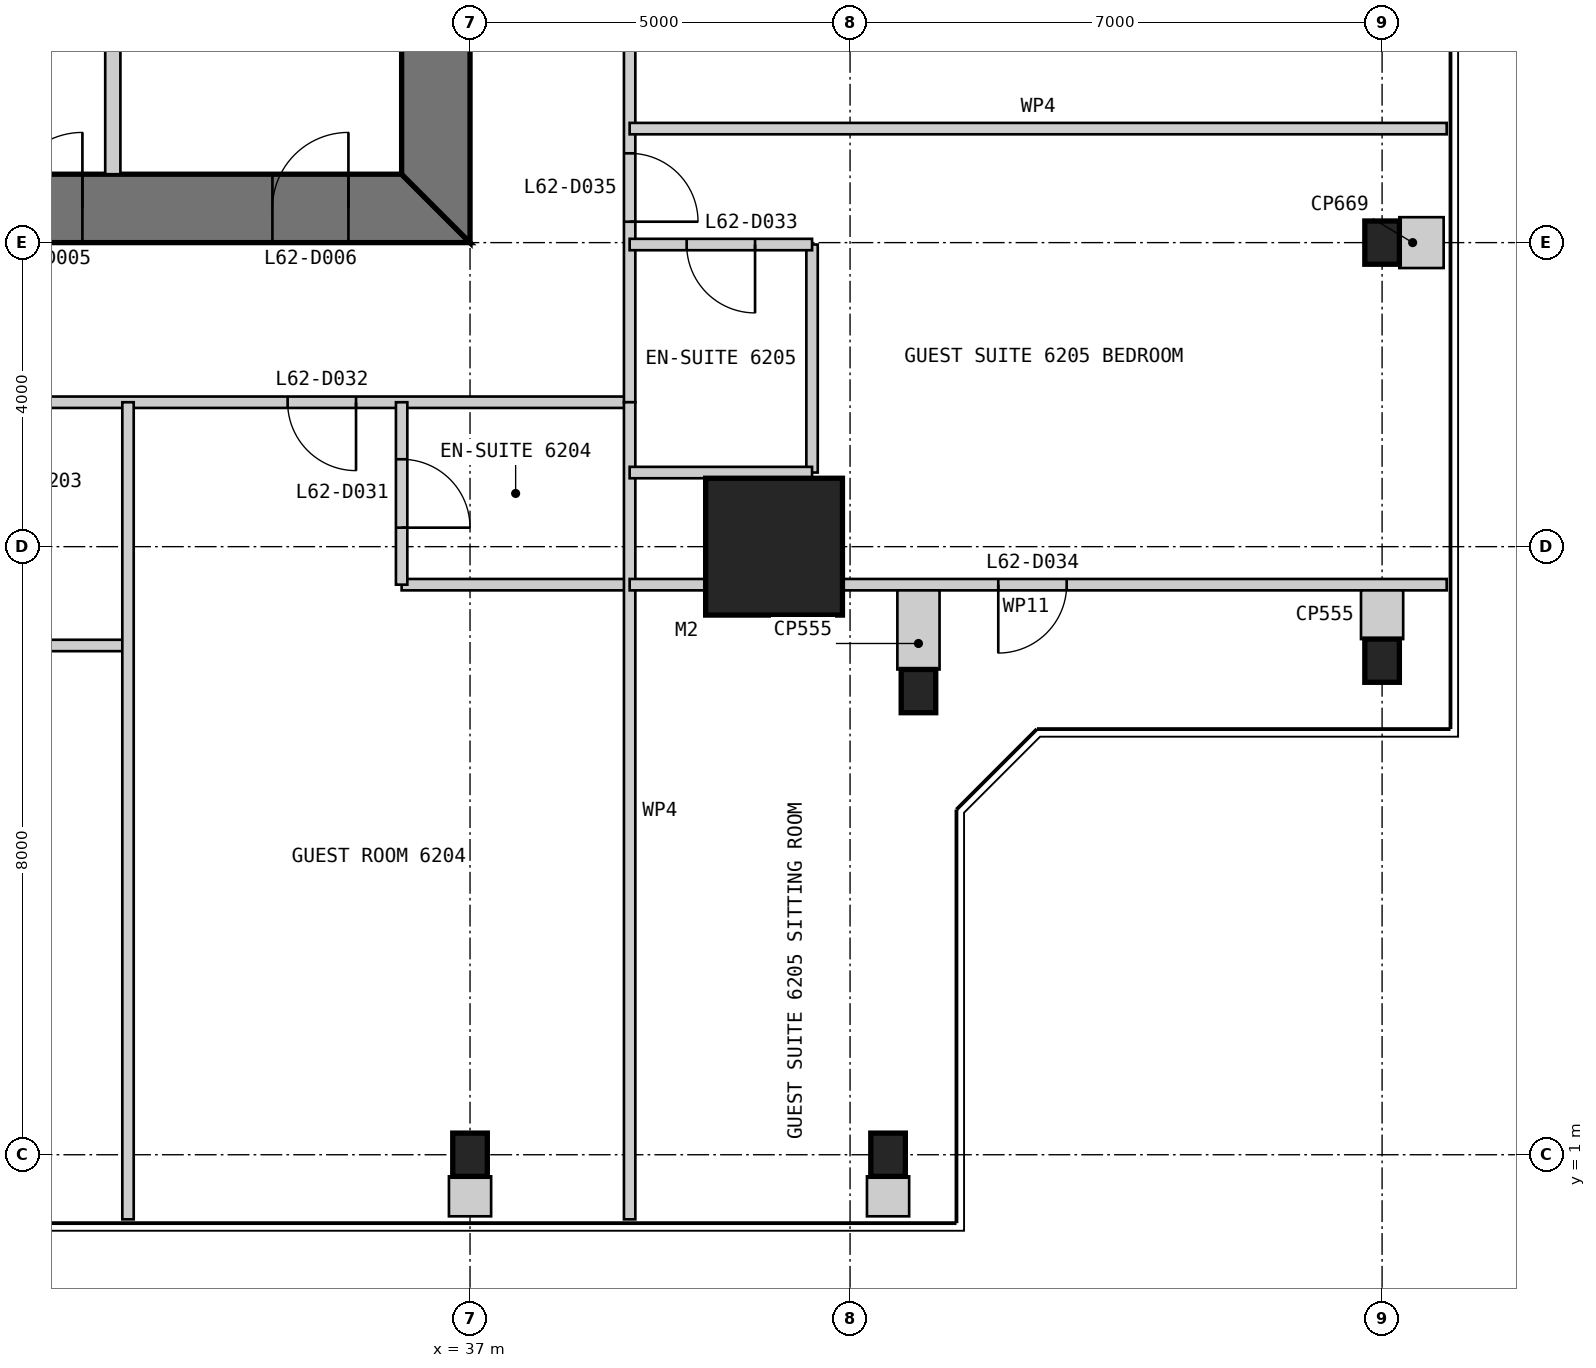
"""IFC4 building model, lengths in metres.
Left out: names, types, materials, properties, quantities, classifications, styles, units other than length and angle.
Written with IfcOpenShell. Run it as: python <this file> out.ifc"""

import sys

from ifc_helpers import new_model, si_unit, direction, frame, frame_2d, origin, origin_2d, place, context, subcontext, project, spatial, polyline, rectangle, i_section, outline, extrude, element, fill, save


model = new_model("IFC4")
c1 = context("Model", 3, precision=1e-05, world=origin(), true_north=direction((0.0, 1.0)))
c2 = subcontext(c1, "Body", "Model", "MODEL_VIEW")
j1 = project(units=[si_unit("LENGTHUNIT", "METRE"), si_unit("PLANEANGLEUNIT", "RADIAN")], contexts=[c1])
p1 = place(None, origin())
s1 = spatial("IfcSite", under=j1, at=p1, CompositionType="ELEMENT")
p2 = place(p1, origin())
s2 = spatial("IfcBuilding", under=s1, at=p2, CompositionType="ELEMENT")
p3 = place(p2, frame((0.0, 0.0, 262.8)))
s3 = spatial("IfcBuildingStorey", under=s2, at=p3, CompositionType="ELEMENT", Elevation=262.8)
p4 = place(p3, frame((41.0, 9.0, 0.0), z_axis=(0.0, 0.0, 1.0), x_axis=(1.0, 0.0, 0.0)))
e1 = element("IfcColumn", 1, at=p4, inside=s3, PredefinedType="COLUMN", context=c2, shape_type="SweptSolid", body=[
    extrude(rectangle(XDim=1.8, YDim=1.8, at=origin_2d()), origin(), (0.0, 0.0, 1.0), 3.4),
])
for number, where, z_axis, x_axis in (
    (2, (37.0, 1.0, 0.0), (0.0, 0.0, 1.0), (1.0, 0.0, 0.0)),
    (3, (42.5, 1.0, 0.0), (0.0, 0.0, 1.0), (1.0, 0.0, 0.0)),
    (4, (42.9, 7.1, 0.0), (0.0, 0.0, 1.0), (1.0, 0.0, 0.0)),
    (5, (49.0, 7.5, 0.0), (0.0, 0.0, 1.0), (1.0, 0.0, 0.0)),
    (6, (49.0, 13.0, 0.0), (0.0, 0.0, 1.0), (1.0, 0.0, 0.0)),
):
    element("IfcColumn", number, at=place(p3, frame(where, z_axis=z_axis, x_axis=x_axis)), inside=s3, PredefinedType="COLUMN", context=c2, shape_type="SweptSolid", body=[
        extrude(i_section(OverallWidth=0.455, OverallDepth=0.569, WebThickness=0.078, FlangeThickness=0.125, at=origin_2d()), origin(), (0.0, 0.0, 1.0), 3.4),
    ])
p5 = place(p3, frame((13.0, 13.45, 0.0), z_axis=(0.0, 0.0, 1.0), x_axis=(1.0, 0.0, 0.0)))
e7 = element("IfcWall", 7, at=p5, inside=s3, PredefinedType="SHEAR", context=c2, shape_type="SweptSolid", body=[
    extrude(outline(polyline([(0.0, -0.45), (24.0, -0.45), (23.1, 0.45), (0.9, 0.45), (0.0, -0.45)])), origin(), (0.0, 0.0, 1.0), 3.4),
])
p6 = place(p5, frame((4.9, 0.0, 0.0)))
e8 = element("IfcOpeningElement", 8, at=p6, cuts=e7, PredefinedType="OPENING", context=c2, shape_type="SweptSolid", body=[
    extrude(rectangle(XDim=1.0, YDim=2.2, at=frame_2d((0.5, 1.1))), frame((0.0, 0.46, 0.0), z_axis=(0.0, -1.0, 0.0), x_axis=(1.0, 0.0, 0.0)), (0.0, 0.0, 1.0), 0.92),
])
p7 = place(p5, frame((8.9, 0.0, 0.0)))
e9 = element("IfcOpeningElement", 9, at=p7, cuts=e7, PredefinedType="OPENING", context=c2, shape_type="SweptSolid", body=[
    extrude(rectangle(XDim=1.1, YDim=2.2, at=frame_2d((0.55, 1.1))), frame((0.0, 0.46, 0.0), z_axis=(0.0, -1.0, 0.0), x_axis=(1.0, 0.0, 0.0)), (0.0, 0.0, 1.0), 0.92),
])
p8 = place(p5, frame((15.05, 0.0, 0.0)))
e10 = element("IfcOpeningElement", 10, at=p8, cuts=e7, PredefinedType="OPENING", context=c2, shape_type="SweptSolid", body=[
    extrude(rectangle(XDim=0.9, YDim=2.2, at=frame_2d((0.45, 1.1))), frame((0.0, 0.46, 0.0), z_axis=(0.0, -1.0, 0.0), x_axis=(1.0, 0.0, 0.0)), (0.0, 0.0, 1.0), 0.92),
])
p9 = place(p5, frame((17.9, 0.0, 0.0)))
e11 = element("IfcOpeningElement", 11, at=p9, cuts=e7, PredefinedType="OPENING", context=c2, shape_type="SweptSolid", body=[
    extrude(rectangle(XDim=1.0, YDim=2.2, at=frame_2d((0.5, 1.1))), frame((0.0, 0.46, 0.0), z_axis=(0.0, -1.0, 0.0), x_axis=(1.0, 0.0, 0.0)), (0.0, 0.0, 1.0), 0.92),
])
p10 = place(p5, frame((21.4, 0.0, 0.0)))
e12 = element("IfcOpeningElement", 12, at=p10, cuts=e7, PredefinedType="OPENING", context=c2, shape_type="SweptSolid", body=[
    extrude(rectangle(XDim=1.0, YDim=2.2, at=frame_2d((0.5, 1.1))), frame((0.0, 0.46, 0.0), z_axis=(0.0, -1.0, 0.0), x_axis=(1.0, 0.0, 0.0)), (0.0, 0.0, 1.0), 0.92),
])
p11 = place(p3, frame((36.55, 13.9, 0.0), z_axis=(0.0, 0.0, 1.0), x_axis=(0.0, 1.0, 0.0)))
e13 = element("IfcWall", 13, at=p11, inside=s3, PredefinedType="SHEAR", context=c2, shape_type="SweptSolid", body=[
    extrude(outline(polyline([(-0.9, -0.45), (23.1, -0.45), (22.2, 0.45), (0.0, 0.45), (-0.9, -0.45)])), origin(), (0.0, 0.0, 1.0), 3.4),
])
p12 = place(p11, frame((20.2, 0.0, 0.0)))
e14 = element("IfcOpeningElement", 14, at=p12, cuts=e13, PredefinedType="OPENING", context=c2, shape_type="SweptSolid", body=[
    extrude(rectangle(XDim=1.0, YDim=2.2, at=frame_2d((0.5, 1.1))), frame((0.0, 0.46, 0.0), z_axis=(0.0, -1.0, 0.0), x_axis=(1.0, 0.0, 0.0)), (0.0, 0.0, 1.0), 0.92),
])
p13 = place(p11, frame((17.25, 0.0, 0.0)))
e15 = element("IfcOpeningElement", 15, at=p13, cuts=e13, PredefinedType="OPENING", context=c2, shape_type="SweptSolid", body=[
    extrude(rectangle(XDim=0.9, YDim=2.2, at=frame_2d((0.45, 1.1))), frame((0.0, 0.46, 0.0), z_axis=(0.0, -1.0, 0.0), x_axis=(1.0, 0.0, 0.0)), (0.0, 0.0, 1.0), 0.92),
])
p14 = place(p3, frame((32.3, 13.9, 0.0), z_axis=(0.0, 0.0, 1.0), x_axis=(0.0, 1.0, 0.0)))
e16 = element("IfcWall", 16, at=p14, inside=s3, PredefinedType="PARTITIONING", context=c2, shape_type="SweptSolid", body=[
    extrude(rectangle(XDim=6.1, YDim=0.2, at=frame_2d((3.05, 0.0))), origin(), (0.0, 0.0, 1.0), 3.2),
])
p15 = place(p3, frame((10.9, 10.9, 0.0), z_axis=(0.0, 0.0, 1.0), x_axis=(1.0, 0.0, 0.0)))
e17 = element("IfcWall", 17, at=p15, inside=s3, PredefinedType="PARTITIONING", context=c2, shape_type="SweptSolid", body=[
    extrude(rectangle(XDim=28.2, YDim=0.15, at=frame_2d((14.1, 0.0))), origin(), (0.0, 0.0, 1.0), 3.25),
])
p16 = place(p15, frame((2.375, 0.0, 0.0)))
e18 = element("IfcOpeningElement", 18, at=p16, cuts=e17, PredefinedType="OPENING", context=c2, shape_type="SweptSolid", body=[
    extrude(rectangle(XDim=0.9, YDim=2.1, at=frame_2d((0.45, 1.05))), frame((0.0, 0.085, 0.0), z_axis=(0.0, -1.0, 0.0), x_axis=(1.0, 0.0, 0.0)), (0.0, 0.0, 1.0), 0.17),
])
p17 = place(p15, frame((10.7, 0.0, 0.0)))
e19 = element("IfcOpeningElement", 19, at=p17, cuts=e17, PredefinedType="OPENING", context=c2, shape_type="SweptSolid", body=[
    extrude(rectangle(XDim=0.9, YDim=2.1, at=frame_2d((0.45, 1.05))), frame((0.0, 0.085, 0.0), z_axis=(0.0, -1.0, 0.0), x_axis=(1.0, 0.0, 0.0)), (0.0, 0.0, 1.0), 0.17),
])
p18 = place(p15, frame((16.8, 0.0, 0.0)))
e20 = element("IfcOpeningElement", 20, at=p18, cuts=e17, PredefinedType="OPENING", context=c2, shape_type="SweptSolid", body=[
    extrude(rectangle(XDim=1.0, YDim=2.1, at=frame_2d((0.5, 1.05))), frame((0.0, 0.085, 0.0), z_axis=(0.0, -1.0, 0.0), x_axis=(1.0, 0.0, 0.0)), (0.0, 0.0, 1.0), 0.17),
])
p19 = place(p15, frame((23.7, 0.0, 0.0)))
e21 = element("IfcOpeningElement", 21, at=p19, cuts=e17, PredefinedType="OPENING", context=c2, shape_type="SweptSolid", body=[
    extrude(rectangle(XDim=0.9, YDim=2.1, at=frame_2d((0.45, 1.05))), frame((0.0, 0.085, 0.0), z_axis=(0.0, -1.0, 0.0), x_axis=(1.0, 0.0, 0.0)), (0.0, 0.0, 1.0), 0.17),
])
p20 = place(p3, frame((29.3, 7.7, 0.0), z_axis=(0.0, 0.0, 1.0), x_axis=(1.0, 0.0, 0.0)))
e22 = element("IfcWall", 22, at=p20, inside=s3, PredefinedType="PARTITIONING", context=c2, shape_type="SweptSolid", body=[
    extrude(rectangle(XDim=3.2, YDim=0.15, at=frame_2d((1.6, 0.0))), origin(), (0.0, 0.0, 1.0), 3.25),
])
p21 = place(p3, frame((32.5, 0.15, 0.0), z_axis=(0.0, 0.0, 1.0), x_axis=(0.0, 1.0, 0.0)))
e23 = element("IfcWall", 23, at=p21, inside=s3, PredefinedType="PARTITIONING", context=c2, shape_type="SweptSolid", body=[
    extrude(rectangle(XDim=10.75, YDim=0.15, at=frame_2d((5.375, 0.0))), origin(), (0.0, 0.0, 1.0), 3.25),
])
p22 = place(p3, frame((36.1, 8.5, 0.0), z_axis=(0.0, 0.0, 1.0), x_axis=(1.0, 0.0, 0.0)))
e24 = element("IfcWall", 24, at=p22, inside=s3, PredefinedType="PARTITIONING", context=c2, shape_type="SweptSolid", body=[
    extrude(rectangle(XDim=3.0, YDim=0.15, at=frame_2d((1.5, 0.0))), origin(), (0.0, 0.0, 1.0), 3.25),
])
p23 = place(p3, frame((36.1, 8.5, 0.0), z_axis=(0.0, 0.0, 1.0), x_axis=(0.0, 1.0, 0.0)))
e25 = element("IfcWall", 25, at=p23, inside=s3, PredefinedType="PARTITIONING", context=c2, shape_type="SweptSolid", body=[
    extrude(rectangle(XDim=2.4, YDim=0.15, at=frame_2d((1.2, 0.0))), origin(), (0.0, 0.0, 1.0), 3.25),
])
p24 = place(p23, frame((0.75, 0.0, 0.0)))
e26 = element("IfcOpeningElement", 26, at=p24, cuts=e25, PredefinedType="OPENING", context=c2, shape_type="SweptSolid", body=[
    extrude(rectangle(XDim=0.9, YDim=2.1, at=frame_2d((0.45, 1.05))), frame((0.0, 0.085, 0.0), z_axis=(0.0, -1.0, 0.0), x_axis=(1.0, 0.0, 0.0)), (0.0, 0.0, 1.0), 0.17),
])
p25 = place(p3, frame((39.1, 10.9, 0.0), z_axis=(0.0, 0.0, 1.0), x_axis=(0.0, 1.0, 0.0)))
e27 = element("IfcWall", 27, at=p25, inside=s3, PredefinedType="PARTITIONING", context=c2, shape_type="SweptSolid", body=[
    extrude(rectangle(XDim=28.2, YDim=0.15, at=frame_2d((14.1, 0.0))), origin(), (0.0, 0.0, 1.0), 3.25),
])
p26 = place(p25, frame((2.375, 0.0, 0.0)))
e28 = element("IfcOpeningElement", 28, at=p26, cuts=e27, PredefinedType="OPENING", context=c2, shape_type="SweptSolid", body=[
    extrude(rectangle(XDim=0.9, YDim=2.1, at=frame_2d((0.45, 1.05))), frame((0.0, 0.085, 0.0), z_axis=(0.0, -1.0, 0.0), x_axis=(1.0, 0.0, 0.0)), (0.0, 0.0, 1.0), 0.17),
])
p27 = place(p25, frame((10.7, 0.0, 0.0)))
e29 = element("IfcOpeningElement", 29, at=p27, cuts=e27, PredefinedType="OPENING", context=c2, shape_type="SweptSolid", body=[
    extrude(rectangle(XDim=0.9, YDim=2.1, at=frame_2d((0.45, 1.05))), frame((0.0, 0.085, 0.0), z_axis=(0.0, -1.0, 0.0), x_axis=(1.0, 0.0, 0.0)), (0.0, 0.0, 1.0), 0.17),
])
p28 = place(p25, frame((17.1, 0.0, 0.0)))
e30 = element("IfcOpeningElement", 30, at=p28, cuts=e27, PredefinedType="OPENING", context=c2, shape_type="SweptSolid", body=[
    extrude(rectangle(XDim=0.9, YDim=2.1, at=frame_2d((0.45, 1.05))), frame((0.0, 0.085, 0.0), z_axis=(0.0, -1.0, 0.0), x_axis=(1.0, 0.0, 0.0)), (0.0, 0.0, 1.0), 0.17),
])
p29 = place(p25, frame((23.7, 0.0, 0.0)))
e31 = element("IfcOpeningElement", 31, at=p29, cuts=e27, PredefinedType="OPENING", context=c2, shape_type="SweptSolid", body=[
    extrude(rectangle(XDim=0.9, YDim=2.1, at=frame_2d((0.45, 1.05))), frame((0.0, 0.085, 0.0), z_axis=(0.0, -1.0, 0.0), x_axis=(1.0, 0.0, 0.0)), (0.0, 0.0, 1.0), 0.17),
])
p30 = place(p3, frame((39.1, 0.15, 0.0), z_axis=(0.0, 0.0, 1.0), x_axis=(0.0, 1.0, 0.0)))
e32 = element("IfcWall", 32, at=p30, inside=s3, PredefinedType="PARTITIONING", context=c2, shape_type="SweptSolid", body=[
    extrude(rectangle(XDim=10.75, YDim=0.15, at=frame_2d((5.375, 0.0))), origin(), (0.0, 0.0, 1.0), 3.25),
])
p31 = place(p3, frame((41.5, 9.975, 0.0), z_axis=(0.0, 0.0, 1.0), x_axis=(0.0, 1.0, 0.0)))
e33 = element("IfcWall", 33, at=p31, inside=s3, PredefinedType="PARTITIONING", context=c2, shape_type="SweptSolid", body=[
    extrude(rectangle(XDim=3.0, YDim=0.15, at=frame_2d((1.5, 0.0))), origin(), (0.0, 0.0, 1.0), 3.25),
])
p32 = place(p3, frame((41.5, 12.975, 0.0), z_axis=(0.0, 0.0, 1.0), x_axis=(-1.0, 0.0, 0.0)))
e34 = element("IfcWall", 34, at=p32, inside=s3, PredefinedType="PARTITIONING", context=c2, shape_type="SweptSolid", body=[
    extrude(rectangle(XDim=2.4, YDim=0.15, at=frame_2d((1.2, 0.0))), origin(), (0.0, 0.0, 1.0), 2.404),
])
p33 = place(p32, frame((0.75, 0.0, 0.0)))
e35 = element("IfcOpeningElement", 35, at=p33, cuts=e34, PredefinedType="OPENING", context=c2, shape_type="SweptSolid", body=[
    extrude(rectangle(XDim=0.9, YDim=2.1, at=frame_2d((0.45, 1.05))), frame((0.0, 0.085, 0.0), z_axis=(0.0, -1.0, 0.0), x_axis=(1.0, 0.0, 0.0)), (0.0, 0.0, 1.0), 0.17),
])
p34 = place(p3, frame((41.5, 9.975, 0.0), z_axis=(0.0, 0.0, 1.0), x_axis=(-1.0, 0.0, 0.0)))
e36 = element("IfcWall", 36, at=p34, inside=s3, PredefinedType="PARTITIONING", context=c2, shape_type="SweptSolid", body=[
    extrude(rectangle(XDim=2.4, YDim=0.15, at=frame_2d((1.2, 0.0))), origin(), (0.0, 0.0, 1.0), 3.25),
])
p35 = place(p3, frame((49.85, 8.5, 0.0), z_axis=(0.0, 0.0, 1.0), x_axis=(-1.0, 0.0, 0.0)))
e37 = element("IfcWall", 37, at=p35, inside=s3, PredefinedType="PARTITIONING", context=c2, shape_type="SweptSolid", body=[
    extrude(rectangle(XDim=10.75, YDim=0.15, at=frame_2d((5.375, 0.0))), origin(), (0.0, 0.0, 1.0), 3.25),
])
p36 = place(p35, frame((5.0, 0.0, 0.0)))
e38 = element("IfcOpeningElement", 38, at=p36, cuts=e37, PredefinedType="OPENING", context=c2, shape_type="SweptSolid", body=[
    extrude(rectangle(XDim=0.9, YDim=2.1, at=frame_2d((0.45, 1.05))), frame((0.0, 0.085, 0.0), z_axis=(0.0, -1.0, 0.0), x_axis=(1.0, 0.0, 0.0)), (0.0, 0.0, 1.0), 0.17),
])
p37 = place(p3, frame((49.85, 14.5, 0.0), z_axis=(0.0, 0.0, 1.0), x_axis=(-1.0, 0.0, 0.0)))
e39 = element("IfcWall", 39, at=p37, inside=s3, PredefinedType="PARTITIONING", context=c2, shape_type="SweptSolid", body=[
    extrude(rectangle(XDim=10.75, YDim=0.15, at=frame_2d((5.375, 0.0))), origin(), (0.0, 0.0, 1.0), 3.25),
])
for number, where, z_axis, x_axis in (
    (40, (37.0, 0.19, 0.0), (0.0, 0.0, 1.0), (0.0, 1.0, 0.0)),
    (41, (42.5, 0.19, 0.0), (0.0, 0.0, 1.0), (0.0, 1.0, 0.0)),
):
    element("IfcWall", number, at=place(p3, frame(where, z_axis=z_axis, x_axis=x_axis)), inside=s3, PredefinedType="PARTITIONING", context=c2, shape_type="SweptSolid", body=[
        extrude(rectangle(XDim=0.526, YDim=0.555, at=frame_2d((0.263, 0.0))), origin(), (0.0, 0.0, 1.0), 3.25),
    ])
p38 = place(p3, frame((42.9, 8.425, 0.0), z_axis=(0.0, 0.0, 1.0), x_axis=(0.0, -1.0, 0.0)))
e42 = element("IfcWall", 42, at=p38, inside=s3, PredefinedType="PARTITIONING", context=c2, shape_type="SweptSolid", body=[
    extrude(rectangle(XDim=1.041, YDim=0.555, at=frame_2d((0.52, 0.0))), origin(), (0.0, 0.0, 1.0), 3.25),
])
p39 = place(p3, frame((49.0, 8.425, 0.0), z_axis=(0.0, 0.0, 1.0), x_axis=(0.0, -1.0, 0.0)))
e43 = element("IfcWall", 43, at=p39, inside=s3, PredefinedType="PARTITIONING", context=c2, shape_type="SweptSolid", body=[
    extrude(rectangle(XDim=0.641, YDim=0.555, at=frame_2d((0.32, 0.0))), origin(), (0.0, 0.0, 1.0), 2.338),
])
p40 = place(p3, frame((49.81, 13.0, 0.0), z_axis=(0.0, 0.0, 1.0), x_axis=(-1.0, 0.0, 0.0)))
e44 = element("IfcWall", 44, at=p40, inside=s3, PredefinedType="PARTITIONING", context=c2, shape_type="SweptSolid", body=[
    extrude(rectangle(XDim=0.583, YDim=0.669, at=frame_2d((0.292, 0.0))), origin(), (0.0, 0.0, 1.0), 3.25),
])
p41 = place(p9, origin())
e45 = element("IfcDoor", 45, at=p41, inside=s3, OperationType="SINGLE_SWING_RIGHT", PredefinedType="DOOR", context=c2, shape_type="SweptSolid", body=[
    extrude(rectangle(XDim=1.0, YDim=2.2, at=frame_2d((0.5, 1.1))), frame((0.0, 0.025, 0.0), z_axis=(0.0, -1.0, 0.0), x_axis=(1.0, 0.0, 0.0)), (0.0, 0.0, 1.0), 0.05),
    extrude(outline(polyline([(0.0, 0.0), (0.04, 0.0), (0.04, 2.16), (0.96, 2.16), (0.96, 0.0), (1.0, 0.0), (1.0, 2.2), (0.0, 2.2), (0.0, 0.0)])), frame((0.0, 0.3, 0.0), z_axis=(0.0, -1.0, 0.0), x_axis=(1.0, 0.0, 0.0)), (0.0, 0.0, 1.0), 0.6),
])
fill(e11, e45)
p42 = place(p10, origin())
e46 = element("IfcDoor", 46, at=p42, inside=s3, OperationType="SINGLE_SWING_RIGHT", PredefinedType="DOOR", context=c2, shape_type="SweptSolid", body=[
    extrude(rectangle(XDim=1.0, YDim=2.2, at=frame_2d((0.5, 1.1))), frame((0.0, 0.025, 0.0), z_axis=(0.0, -1.0, 0.0), x_axis=(1.0, 0.0, 0.0)), (0.0, 0.0, 1.0), 0.05),
    extrude(outline(polyline([(0.0, 0.0), (0.04, 0.0), (0.04, 2.16), (0.96, 2.16), (0.96, 0.0), (1.0, 0.0), (1.0, 2.2), (0.0, 2.2), (0.0, 0.0)])), frame((0.0, 0.3, 0.0), z_axis=(0.0, -1.0, 0.0), x_axis=(1.0, 0.0, 0.0)), (0.0, 0.0, 1.0), 0.6),
])
fill(e12, e46)
p43 = place(p24, frame((0.9, 0.0, 0.0), z_axis=(0.0, 0.0, 1.0), x_axis=(-1.0, 0.0, 0.0)))
e47 = element("IfcDoor", 47, at=p43, inside=s3, OperationType="SINGLE_SWING_RIGHT", PredefinedType="DOOR", context=c2, shape_type="SweptSolid", body=[
    extrude(rectangle(XDim=0.9, YDim=2.1, at=frame_2d((0.45, 1.05))), frame((0.0, 0.025, 0.0), z_axis=(0.0, -1.0, 0.0), x_axis=(1.0, 0.0, 0.0)), (0.0, 0.0, 1.0), 0.05),
])
fill(e26, e47)
p44 = place(p19, frame((0.9, 0.0, 0.0), z_axis=(0.0, 0.0, 1.0), x_axis=(-1.0, 0.0, 0.0)))
e48 = element("IfcDoor", 48, at=p44, inside=s3, OperationType="SINGLE_SWING_LEFT", PredefinedType="DOOR", context=c2, shape_type="SweptSolid", body=[
    extrude(rectangle(XDim=0.9, YDim=2.1, at=frame_2d((0.45, 1.05))), frame((0.0, 0.025, 0.0), z_axis=(0.0, -1.0, 0.0), x_axis=(1.0, 0.0, 0.0)), (0.0, 0.0, 1.0), 0.05),
])
fill(e21, e48)
p45 = place(p33, origin())
e49 = element("IfcDoor", 49, at=p45, inside=s3, OperationType="SINGLE_SWING_LEFT", PredefinedType="DOOR", context=c2, shape_type="SweptSolid", body=[
    extrude(rectangle(XDim=0.9, YDim=2.1, at=frame_2d((0.45, 1.05))), frame((0.0, 0.025, 0.0), z_axis=(0.0, -1.0, 0.0), x_axis=(1.0, 0.0, 0.0)), (0.0, 0.0, 1.0), 0.05),
])
fill(e35, e49)
p46 = place(p36, origin())
e50 = element("IfcDoor", 50, at=p46, inside=s3, OperationType="SINGLE_SWING_RIGHT", PredefinedType="DOOR", context=c2, shape_type="SweptSolid", body=[
    extrude(rectangle(XDim=0.9, YDim=2.1, at=frame_2d((0.45, 1.05))), frame((0.0, 0.025, 0.0), z_axis=(0.0, -1.0, 0.0), x_axis=(1.0, 0.0, 0.0)), (0.0, 0.0, 1.0), 0.05),
])
fill(e38, e50)
p47 = place(p26, frame((0.9, 0.0, 0.0), z_axis=(0.0, 0.0, 1.0), x_axis=(-1.0, 0.0, 0.0)))
e51 = element("IfcDoor", 51, at=p47, inside=s3, OperationType="SINGLE_SWING_RIGHT", PredefinedType="DOOR", context=c2, shape_type="SweptSolid", body=[
    extrude(rectangle(XDim=0.9, YDim=2.1, at=frame_2d((0.45, 1.05))), frame((0.0, 0.025, 0.0), z_axis=(0.0, -1.0, 0.0), x_axis=(1.0, 0.0, 0.0)), (0.0, 0.0, 1.0), 0.05),
])
fill(e28, e51)
save(model, sys.argv[1])
